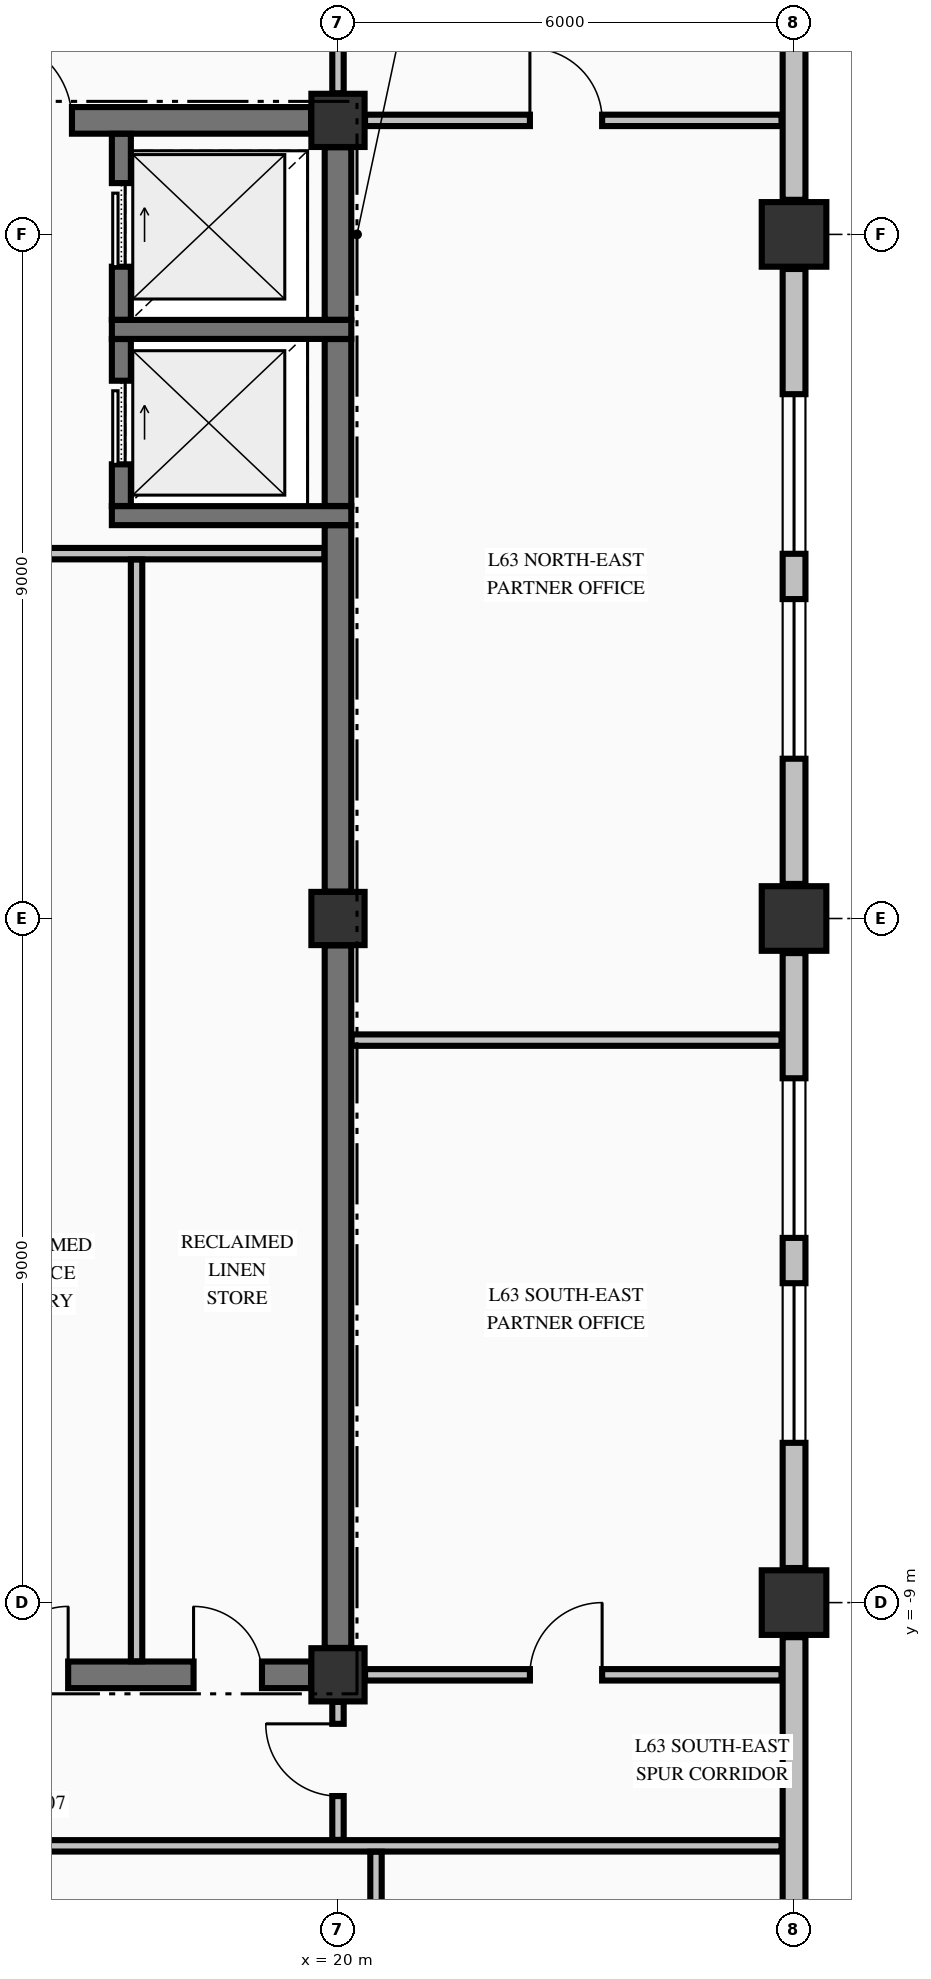
"""IFC4 building model, lengths in metres.
Left out: names, types, materials, properties, quantities, classifications, styles, units other than length and angle.
Written with IfcOpenShell. Run it as: python <this file> out.ifc"""

import sys

from ifc_helpers import new_model, si_unit, direction, frame, frame_2d, origin, origin_2d, place, context, subcontext, project, spatial, rectangle, extrude, element, fill, save


model = new_model("IFC4")
c1 = context("Model", 3, precision=1e-05, world=origin(), true_north=direction((0.0, 1.0)))
c2 = subcontext(c1, "Body", "Model", "MODEL_VIEW")
j1 = project(units=[si_unit("LENGTHUNIT", "METRE"), si_unit("PLANEANGLEUNIT", "RADIAN")], contexts=[c1])
p1 = place(None, origin())
s1 = spatial("IfcSite", under=j1, at=p1, CompositionType="ELEMENT")
p2 = place(p1, origin())
s2 = spatial("IfcBuilding", under=s1, at=p2, CompositionType="ELEMENT")
p3 = place(p2, frame((0.0, 0.0, 239.74)))
s3 = spatial("IfcBuildingStorey", under=s2, at=p3, CompositionType="ELEMENT", Elevation=239.74)
for number, where, z_axis, x_axis in (
    (1, (26.0, -9.0, -0.25), (0.0, 0.0, 1.0), (1.0, 0.0, 0.0)),
    (2, (26.0, 0.0, -0.25), (0.0, 0.0, 1.0), (1.0, 0.0, 0.0)),
    (3, (26.0, 9.0, -0.25), (0.0, 0.0, 1.0), (1.0, 0.0, 0.0)),
):
    element("IfcColumn", number, at=place(p3, frame(where, z_axis=z_axis, x_axis=x_axis)), inside=s3, PredefinedType="COLUMN", context=c2, shape_type="SweptSolid", body=[
        extrude(rectangle(XDim=0.85, YDim=0.85, at=origin_2d()), origin(), (0.0, 0.0, 1.0), 3.23),
    ])
for number, where, z_axis, x_axis in (
    (4, (20.0, -9.95, -0.25), (0.0, 0.0, 1.0), (1.0, 0.0, 0.0)),
    (5, (20.0, 10.5, -0.25), (0.0, 0.0, 1.0), (1.0, 0.0, 0.0)),
    (6, (20.0, 0.0, -0.25), (0.0, 0.0, 1.0), (1.0, 0.0, 0.0)),
):
    element("IfcColumn", number, at=place(p3, frame(where, z_axis=z_axis, x_axis=x_axis)), inside=s3, PredefinedType="COLUMN", context=c2, shape_type="SweptSolid", body=[
        extrude(rectangle(XDim=0.7, YDim=0.7, at=origin_2d()), origin(), (0.0, 0.0, 1.0), 3.23),
    ])
p4 = place(p3, frame((26.0, -17.545, 0.0), z_axis=(0.0, 0.0, 1.0), x_axis=(0.0, 1.0, 0.0)))
e7 = element("IfcWall", 7, at=p4, inside=s3, PredefinedType="STANDARD", context=c2, shape_type="SweptSolid", body=[
    extrude(rectangle(XDim=8.09, YDim=0.3, at=frame_2d((4.045, 0.0))), origin(), (0.0, 0.0, 1.0), 2.372),
])
p5 = place(p3, frame((26.0, -8.545, 0.0), z_axis=(0.0, 0.0, 1.0), x_axis=(0.0, 1.0, 0.0)))
e8 = element("IfcWall", 8, at=p5, inside=s3, PredefinedType="STANDARD", context=c2, shape_type="SweptSolid", body=[
    extrude(rectangle(XDim=8.09, YDim=0.3, at=frame_2d((4.045, 0.0))), origin(), (0.0, 0.0, 1.0), 2.372),
])
p6 = place(p5, frame((1.647, 0.0, 0.7)))
e9 = element("IfcOpeningElement", 9, at=p6, cuts=e8, PredefinedType="OPENING", context=c2, shape_type="SweptSolid", body=[
    extrude(rectangle(XDim=2.1, YDim=1.5, at=frame_2d((1.05, 0.75))), frame((0.0, 0.16, 0.0), z_axis=(0.0, -1.0, 0.0), x_axis=(1.0, 0.0, 0.0)), (0.0, 0.0, 1.0), 0.32),
])
p7 = place(p5, frame((4.343, 0.0, 0.7)))
e10 = element("IfcOpeningElement", 10, at=p7, cuts=e8, PredefinedType="OPENING", context=c2, shape_type="SweptSolid", body=[
    extrude(rectangle(XDim=2.1, YDim=1.5, at=frame_2d((1.05, 0.75))), frame((0.0, 0.16, 0.0), z_axis=(0.0, -1.0, 0.0), x_axis=(1.0, 0.0, 0.0)), (0.0, 0.0, 1.0), 0.32),
])
p8 = place(p3, frame((26.0, 0.455, 0.0), z_axis=(0.0, 0.0, 1.0), x_axis=(0.0, 1.0, 0.0)))
e11 = element("IfcWall", 11, at=p8, inside=s3, PredefinedType="STANDARD", context=c2, shape_type="SweptSolid", body=[
    extrude(rectangle(XDim=8.09, YDim=0.3, at=frame_2d((4.045, 0.0))), origin(), (0.0, 0.0, 1.0), 2.372),
])
p9 = place(p8, frame((1.647, 0.0, 0.7)))
e12 = element("IfcOpeningElement", 12, at=p9, cuts=e11, PredefinedType="OPENING", context=c2, shape_type="SweptSolid", body=[
    extrude(rectangle(XDim=2.1, YDim=1.5, at=frame_2d((1.05, 0.75))), frame((0.0, 0.16, 0.0), z_axis=(0.0, -1.0, 0.0), x_axis=(1.0, 0.0, 0.0)), (0.0, 0.0, 1.0), 0.32),
])
p10 = place(p8, frame((4.343, 0.0, 0.7)))
e13 = element("IfcOpeningElement", 13, at=p10, cuts=e11, PredefinedType="OPENING", context=c2, shape_type="SweptSolid", body=[
    extrude(rectangle(XDim=2.1, YDim=1.5, at=frame_2d((1.05, 0.75))), frame((0.0, 0.16, 0.0), z_axis=(0.0, -1.0, 0.0), x_axis=(1.0, 0.0, 0.0)), (0.0, 0.0, 1.0), 0.32),
])
p11 = place(p3, frame((26.0, 9.455, 0.0), z_axis=(0.0, 0.0, 1.0), x_axis=(0.0, 1.0, 0.0)))
e14 = element("IfcWall", 14, at=p11, inside=s3, PredefinedType="STANDARD", context=c2, shape_type="SweptSolid", body=[
    extrude(rectangle(XDim=8.09, YDim=0.3, at=frame_2d((4.045, 0.0))), origin(), (0.0, 0.0, 1.0), 2.372),
])
p12 = place(p3, frame((14.7, -9.95, 0.0), z_axis=(0.0, 0.0, 1.0), x_axis=(1.0, 0.0, 0.0)))
e15 = element("IfcWall", 15, at=p12, inside=s3, PredefinedType="SHEAR", context=c2, shape_type="SweptSolid", body=[
    extrude(rectangle(XDim=4.946, YDim=0.35, at=frame_2d((2.473, 0.0))), origin(), (0.0, 0.0, 1.0), 2.98),
])
p13 = place(p12, frame((0.85, 0.0, 0.0)))
e16 = element("IfcOpeningElement", 16, at=p13, cuts=e15, PredefinedType="OPENING", context=c2, shape_type="SweptSolid", body=[
    extrude(rectangle(XDim=0.9, YDim=2.15, at=frame_2d((0.45, 1.075))), frame((0.0, 0.185, 0.0), z_axis=(0.0, -1.0, 0.0), x_axis=(1.0, 0.0, 0.0)), (0.0, 0.0, 1.0), 0.37),
])
p14 = place(p12, frame((3.4, 0.0, 0.0)))
e17 = element("IfcOpeningElement", 17, at=p14, cuts=e15, PredefinedType="OPENING", context=c2, shape_type="SweptSolid", body=[
    extrude(rectangle(XDim=0.9, YDim=2.15, at=frame_2d((0.45, 1.075))), frame((0.0, 0.185, 0.0), z_axis=(0.0, -1.0, 0.0), x_axis=(1.0, 0.0, 0.0)), (0.0, 0.0, 1.0), 0.37),
])
for number, where, z_axis, x_axis in (
    (18, (17.025, 5.3, 0.0), (0.0, 0.0, 1.0), (1.0, 0.0, 0.0)),
    (19, (17.025, 7.75, 0.0), (0.0, 0.0, 1.0), (1.0, 0.0, 0.0)),
):
    element("IfcWall", number, at=place(p3, frame(where, z_axis=z_axis, x_axis=x_axis)), inside=s3, PredefinedType="SOLIDWALL", context=c2, shape_type="SweptSolid", body=[
        extrude(rectangle(XDim=3.15, YDim=0.25, at=frame_2d((1.575, 0.0))), origin(), (0.0, 0.0, 1.0), 2.98),
    ])
p15 = place(p3, frame((14.7, 10.5, 0.0), z_axis=(0.0, 0.0, 1.0), x_axis=(1.0, 0.0, 0.0)))
e20 = element("IfcWall", 20, at=p15, inside=s3, PredefinedType="SHEAR", context=c2, shape_type="SweptSolid", body=[
    extrude(rectangle(XDim=4.946, YDim=0.35, at=frame_2d((2.473, 0.0))), origin(), (0.0, 0.0, 1.0), 2.98),
])
p16 = place(p15, frame((0.7, 0.0, 0.0)))
e21 = element("IfcOpeningElement", 21, at=p16, cuts=e20, PredefinedType="OPENING", context=c2, shape_type="SweptSolid", body=[
    extrude(rectangle(XDim=1.1, YDim=2.15, at=frame_2d((0.55, 1.075))), frame((0.0, 0.185, 0.0), z_axis=(0.0, -1.0, 0.0), x_axis=(1.0, 0.0, 0.0)), (0.0, 0.0, 1.0), 0.37),
])
p17 = place(p3, frame((-20.075, -12.2, 0.0), z_axis=(0.0, 0.0, 1.0), x_axis=(1.0, 0.0, 0.0)))
e22 = element("IfcWall", 22, at=p17, inside=s3, PredefinedType="PARTITIONING", context=c2, shape_type="SweptSolid", body=[
    extrude(rectangle(XDim=45.91, YDim=0.15, at=frame_2d((22.955, 0.0))), origin(), (0.0, 0.0, 1.0), 2.98),
])
p18 = place(p17, frame((9.1, 0.0, 0.0)))
e23 = element("IfcOpeningElement", 23, at=p18, cuts=e22, PredefinedType="OPENING", context=c2, shape_type="SweptSolid", body=[
    extrude(rectangle(XDim=0.95, YDim=2.15, at=frame_2d((0.475, 1.075))), frame((0.0, 0.085, 0.0), z_axis=(0.0, -1.0, 0.0), x_axis=(1.0, 0.0, 0.0)), (0.0, 0.0, 1.0), 0.17),
])
p19 = place(p17, frame((17.2, 0.0, 0.0)))
e24 = element("IfcOpeningElement", 24, at=p19, cuts=e22, PredefinedType="OPENING", context=c2, shape_type="SweptSolid", body=[
    extrude(rectangle(XDim=1.05, YDim=2.15, at=frame_2d((0.525, 1.075))), frame((0.0, 0.085, 0.0), z_axis=(0.0, -1.0, 0.0), x_axis=(1.0, 0.0, 0.0)), (0.0, 0.0, 1.0), 0.17),
])
p20 = place(p17, frame((25.35, 0.0, 0.0)))
e25 = element("IfcOpeningElement", 25, at=p20, cuts=e22, PredefinedType="OPENING", context=c2, shape_type="SweptSolid", body=[
    extrude(rectangle(XDim=1.05, YDim=2.15, at=frame_2d((0.525, 1.075))), frame((0.0, 0.085, 0.0), z_axis=(0.0, -1.0, 0.0), x_axis=(1.0, 0.0, 0.0)), (0.0, 0.0, 1.0), 0.17),
])
p21 = place(p3, frame((20.356, -9.95, 0.0), z_axis=(0.0, 0.0, 1.0), x_axis=(1.0, 0.0, 0.0)))
e26 = element("IfcWall", 26, at=p21, inside=s3, PredefinedType="PARTITIONING", context=c2, shape_type="SweptSolid", body=[
    extrude(rectangle(XDim=5.479, YDim=0.15, at=frame_2d((2.74, 0.0))), origin(), (0.0, 0.0, 1.0), 2.98),
])
p22 = place(p21, frame((2.169, 0.0, 0.0)))
e27 = element("IfcOpeningElement", 27, at=p22, cuts=e26, PredefinedType="OPENING", context=c2, shape_type="SweptSolid", body=[
    extrude(rectangle(XDim=0.95, YDim=2.15, at=frame_2d((0.475, 1.075))), frame((0.0, 0.085, 0.0), z_axis=(0.0, -1.0, 0.0), x_axis=(1.0, 0.0, 0.0)), (0.0, 0.0, 1.0), 0.17),
])
p23 = place(p3, frame((20.178, -1.6, 0.0), z_axis=(0.0, 0.0, 1.0), x_axis=(1.0, 0.0, 0.0)))
e28 = element("IfcWall", 28, at=p23, inside=s3, PredefinedType="PARTITIONING", context=c2, shape_type="SweptSolid", body=[
    extrude(rectangle(XDim=5.657, YDim=0.15, at=frame_2d((2.829, 0.0))), origin(), (0.0, 0.0, 1.0), 2.98),
])
p24 = place(p3, frame((14.878, 4.8, 0.0), z_axis=(0.0, 0.0, 1.0), x_axis=(1.0, 0.0, 0.0)))
e29 = element("IfcWall", 29, at=p24, inside=s3, PredefinedType="PARTITIONING", context=c2, shape_type="SweptSolid", body=[
    extrude(rectangle(XDim=4.944, YDim=0.15, at=frame_2d((2.472, 0.0))), origin(), (0.0, 0.0, 1.0), 2.98),
])
p25 = place(p3, frame((20.356, 10.5, 0.0), z_axis=(0.0, 0.0, 1.0), x_axis=(1.0, 0.0, 0.0)))
e30 = element("IfcWall", 30, at=p25, inside=s3, PredefinedType="PARTITIONING", context=c2, shape_type="SweptSolid", body=[
    extrude(rectangle(XDim=5.479, YDim=0.15, at=frame_2d((2.74, 0.0))), origin(), (0.0, 0.0, 1.0), 2.98),
])
p26 = place(p25, frame((2.169, 0.0, 0.0)))
e31 = element("IfcOpeningElement", 31, at=p26, cuts=e30, PredefinedType="OPENING", context=c2, shape_type="SweptSolid", body=[
    extrude(rectangle(XDim=0.95, YDim=2.15, at=frame_2d((0.475, 1.075))), frame((0.0, 0.085, 0.0), z_axis=(0.0, -1.0, 0.0), x_axis=(1.0, 0.0, 0.0)), (0.0, 0.0, 1.0), 0.17),
])
p27 = place(p3, frame((17.15, 5.427, 0.0), z_axis=(0.0, 0.0, 1.0), x_axis=(0.0, 1.0, 0.0)))
e32 = element("IfcWall", 32, at=p27, inside=s3, PredefinedType="SOLIDWALL", context=c2, shape_type="SweptSolid", body=[
    extrude(rectangle(XDim=2.196, YDim=0.25, at=frame_2d((1.098, 0.0))), origin(), (0.0, 0.0, 1.0), 2.98),
])
p28 = place(p27, frame((0.548, 0.0, 0.0)))
e33 = element("IfcOpeningElement", 33, at=p28, cuts=e32, PredefinedType="OPENING", context=c2, shape_type="SweptSolid", body=[
    extrude(rectangle(XDim=1.1, YDim=2.2, at=frame_2d((0.55, 1.1))), frame((0.0, 0.135, 0.0), z_axis=(0.0, -1.0, 0.0), x_axis=(1.0, 0.0, 0.0)), (0.0, 0.0, 1.0), 0.27),
])
p29 = place(p3, frame((17.15, 7.877, 0.0), z_axis=(0.0, 0.0, 1.0), x_axis=(0.0, 1.0, 0.0)))
e34 = element("IfcWall", 34, at=p29, inside=s3, PredefinedType="SOLIDWALL", context=c2, shape_type="SweptSolid", body=[
    extrude(rectangle(XDim=2.446, YDim=0.25, at=frame_2d((1.223, 0.0))), origin(), (0.0, 0.0, 1.0), 2.98),
])
p30 = place(p29, frame((0.698, 0.0, 0.0)))
e35 = element("IfcOpeningElement", 35, at=p30, cuts=e34, PredefinedType="OPENING", context=c2, shape_type="SweptSolid", body=[
    extrude(rectangle(XDim=1.1, YDim=2.2, at=frame_2d((0.55, 1.1))), frame((0.0, 0.135, 0.0), z_axis=(0.0, -1.0, 0.0), x_axis=(1.0, 0.0, 0.0)), (0.0, 0.0, 1.0), 0.27),
])
p31 = place(p3, frame((20.0, -9.596, 0.0), z_axis=(0.0, 0.0, 1.0), x_axis=(0.0, 1.0, 0.0)))
e36 = element("IfcWall", 36, at=p31, inside=s3, PredefinedType="SHEAR", context=c2, shape_type="SweptSolid", body=[
    extrude(rectangle(XDim=9.242, YDim=0.35, at=frame_2d((4.621, 0.0))), origin(), (0.0, 0.0, 1.0), 2.98),
])
p32 = place(p3, frame((20.0, 0.354, 0.0), z_axis=(0.0, 0.0, 1.0), x_axis=(0.0, 1.0, 0.0)))
e37 = element("IfcWall", 37, at=p32, inside=s3, PredefinedType="SHEAR", context=c2, shape_type="SweptSolid", body=[
    extrude(rectangle(XDim=4.819, YDim=0.35, at=frame_2d((2.41, 0.0))), origin(), (0.0, 0.0, 1.0), 2.98),
])
p33 = place(p3, frame((20.0, 5.427, 0.0), z_axis=(0.0, 0.0, 1.0), x_axis=(0.0, 1.0, 0.0)))
e38 = element("IfcWall", 38, at=p33, inside=s3, PredefinedType="SHEAR", context=c2, shape_type="SweptSolid", body=[
    extrude(rectangle(XDim=2.196, YDim=0.35, at=frame_2d((1.098, 0.0))), origin(), (0.0, 0.0, 1.0), 2.98),
])
p34 = place(p3, frame((20.0, 7.877, 0.0), z_axis=(0.0, 0.0, 1.0), x_axis=(0.0, 1.0, 0.0)))
e39 = element("IfcWall", 39, at=p34, inside=s3, PredefinedType="SHEAR", context=c2, shape_type="SweptSolid", body=[
    extrude(rectangle(XDim=2.269, YDim=0.35, at=frame_2d((1.135, 0.0))), origin(), (0.0, 0.0, 1.0), 2.98),
])
p35 = place(p3, frame((17.35, -9.772, 0.0), z_axis=(0.0, 0.0, 1.0), x_axis=(0.0, 1.0, 0.0)))
e40 = element("IfcWall", 40, at=p35, inside=s3, PredefinedType="PARTITIONING", context=c2, shape_type="SweptSolid", body=[
    extrude(rectangle(XDim=14.494, YDim=0.15, at=frame_2d((7.247, 0.0))), origin(), (0.0, 0.0, 1.0), 2.98),
])
p36 = place(p3, frame((20.0, -12.122, 0.0), z_axis=(0.0, 0.0, 1.0), x_axis=(0.0, 1.0, 0.0)))
e41 = element("IfcWall", 41, at=p36, inside=s3, PredefinedType="PARTITIONING", context=c2, shape_type="SweptSolid", body=[
    extrude(rectangle(XDim=1.816, YDim=0.15, at=frame_2d((0.908, 0.0))), origin(), (0.0, 0.0, 1.0), 2.98),
])
p37 = place(p36, frame((0.577, 0.0, 0.0)))
e42 = element("IfcOpeningElement", 42, at=p37, cuts=e41, PredefinedType="OPENING", context=c2, shape_type="SweptSolid", body=[
    extrude(rectangle(XDim=0.95, YDim=2.15, at=frame_2d((0.475, 1.075))), frame((0.0, 0.085, 0.0), z_axis=(0.0, -1.0, 0.0), x_axis=(1.0, 0.0, 0.0)), (0.0, 0.0, 1.0), 0.17),
])
p38 = place(p3, frame((20.0, 10.856, 0.0), z_axis=(0.0, 0.0, 1.0), x_axis=(0.0, 1.0, 0.0)))
e43 = element("IfcWall", 43, at=p38, inside=s3, PredefinedType="PARTITIONING", context=c2, shape_type="SweptSolid", body=[
    extrude(rectangle(XDim=2.666, YDim=0.15, at=frame_2d((1.333, 0.0))), origin(), (0.0, 0.0, 1.0), 2.98),
])
p39 = place(p38, frame((0.719, 0.0, 0.0)))
e44 = element("IfcOpeningElement", 44, at=p39, cuts=e43, PredefinedType="OPENING", context=c2, shape_type="SweptSolid", body=[
    extrude(rectangle(XDim=0.95, YDim=2.15, at=frame_2d((0.475, 1.075))), frame((0.0, 0.085, 0.0), z_axis=(0.0, -1.0, 0.0), x_axis=(1.0, 0.0, 0.0)), (0.0, 0.0, 1.0), 0.17),
])
p40 = place(p3, frame((20.5, -17.569, 0.0), z_axis=(0.0, 0.0, 1.0), x_axis=(0.0, 1.0, 0.0)))
e45 = element("IfcWall", 45, at=p40, inside=s3, PredefinedType="PARTITIONING", context=c2, shape_type="SweptSolid", body=[
    extrude(rectangle(XDim=5.291, YDim=0.15, at=frame_2d((2.646, 0.0))), origin(), (0.0, 0.0, 1.0), 2.98),
])
p41 = place(p6, origin())
e46 = element("IfcWindow", 46, at=p41, inside=s3, PartitioningType="SINGLE_PANEL", PredefinedType="WINDOW", context=c2, shape_type="SweptSolid", body=[
    extrude(rectangle(XDim=2.1, YDim=1.5, at=frame_2d((1.05, 0.75))), frame((0.0, 0.03, 0.0), z_axis=(0.0, -1.0, 0.0), x_axis=(1.0, 0.0, 0.0)), (0.0, 0.0, 1.0), 0.06),
])
fill(e9, e46)
p42 = place(p7, origin())
e47 = element("IfcWindow", 47, at=p42, inside=s3, PartitioningType="SINGLE_PANEL", PredefinedType="WINDOW", context=c2, shape_type="SweptSolid", body=[
    extrude(rectangle(XDim=2.1, YDim=1.5, at=frame_2d((1.05, 0.75))), frame((0.0, 0.03, 0.0), z_axis=(0.0, -1.0, 0.0), x_axis=(1.0, 0.0, 0.0)), (0.0, 0.0, 1.0), 0.06),
])
fill(e10, e47)
p43 = place(p9, origin())
e48 = element("IfcWindow", 48, at=p43, inside=s3, PartitioningType="SINGLE_PANEL", PredefinedType="WINDOW", context=c2, shape_type="SweptSolid", body=[
    extrude(rectangle(XDim=2.1, YDim=1.5, at=frame_2d((1.05, 0.75))), frame((0.0, 0.03, 0.0), z_axis=(0.0, -1.0, 0.0), x_axis=(1.0, 0.0, 0.0)), (0.0, 0.0, 1.0), 0.06),
])
fill(e12, e48)
p44 = place(p10, origin())
e49 = element("IfcWindow", 49, at=p44, inside=s3, PartitioningType="SINGLE_PANEL", PredefinedType="WINDOW", context=c2, shape_type="SweptSolid", body=[
    extrude(rectangle(XDim=2.1, YDim=1.5, at=frame_2d((1.05, 0.75))), frame((0.0, 0.03, 0.0), z_axis=(0.0, -1.0, 0.0), x_axis=(1.0, 0.0, 0.0)), (0.0, 0.0, 1.0), 0.06),
])
fill(e13, e49)
p45 = place(p28, origin())
e50 = element("IfcDoor", 50, at=p45, inside=s3, OperationType="SLIDING_TO_RIGHT", PredefinedType="DOOR", context=c2, shape_type="SweptSolid", body=[
    extrude(rectangle(XDim=1.1, YDim=2.2, at=frame_2d((0.55, 1.1))), frame((0.0, 0.025, 0.0), z_axis=(0.0, -1.0, 0.0), x_axis=(1.0, 0.0, 0.0)), (0.0, 0.0, 1.0), 0.05),
])
fill(e33, e50)
p46 = place(p30, origin())
e51 = element("IfcDoor", 51, at=p46, inside=s3, OperationType="SLIDING_TO_RIGHT", PredefinedType="DOOR", context=c2, shape_type="SweptSolid", body=[
    extrude(rectangle(XDim=1.1, YDim=2.2, at=frame_2d((0.55, 1.1))), frame((0.0, 0.025, 0.0), z_axis=(0.0, -1.0, 0.0), x_axis=(1.0, 0.0, 0.0)), (0.0, 0.0, 1.0), 0.05),
])
fill(e35, e51)
p47 = place(p16, origin())
e52 = element("IfcDoor", 52, at=p47, inside=s3, OperationType="SINGLE_SWING_LEFT", PredefinedType="DOOR", context=c2, shape_type="SweptSolid", body=[
    extrude(rectangle(XDim=1.1, YDim=2.15, at=frame_2d((0.55, 1.075))), frame((0.0, 0.025, 0.0), z_axis=(0.0, -1.0, 0.0), x_axis=(1.0, 0.0, 0.0)), (0.0, 0.0, 1.0), 0.05),
])
fill(e21, e52)
p48 = place(p13, origin())
e53 = element("IfcDoor", 53, at=p48, inside=s3, OperationType="SINGLE_SWING_RIGHT", PredefinedType="DOOR", context=c2, shape_type="SweptSolid", body=[
    extrude(rectangle(XDim=0.9, YDim=2.15, at=frame_2d((0.45, 1.075))), frame((0.0, 0.025, 0.0), z_axis=(0.0, -1.0, 0.0), x_axis=(1.0, 0.0, 0.0)), (0.0, 0.0, 1.0), 0.05),
])
fill(e16, e53)
p49 = place(p14, origin())
e54 = element("IfcDoor", 54, at=p49, inside=s3, OperationType="SINGLE_SWING_LEFT", PredefinedType="DOOR", context=c2, shape_type="SweptSolid", body=[
    extrude(rectangle(XDim=0.9, YDim=2.15, at=frame_2d((0.45, 1.075))), frame((0.0, 0.025, 0.0), z_axis=(0.0, -1.0, 0.0), x_axis=(1.0, 0.0, 0.0)), (0.0, 0.0, 1.0), 0.05),
])
fill(e17, e54)
p50 = place(p37, origin())
e55 = element("IfcDoor", 55, at=p50, inside=s3, OperationType="SINGLE_SWING_RIGHT", PredefinedType="DOOR", context=c2, shape_type="SweptSolid", body=[
    extrude(rectangle(XDim=0.95, YDim=2.15, at=frame_2d((0.475, 1.075))), frame((0.0, 0.025, 0.0), z_axis=(0.0, -1.0, 0.0), x_axis=(1.0, 0.0, 0.0)), (0.0, 0.0, 1.0), 0.05),
])
fill(e42, e55)
p51 = place(p26, origin())
e56 = element("IfcDoor", 56, at=p51, inside=s3, OperationType="SINGLE_SWING_LEFT", PredefinedType="DOOR", context=c2, shape_type="SweptSolid", body=[
    extrude(rectangle(XDim=0.95, YDim=2.15, at=frame_2d((0.475, 1.075))), frame((0.0, 0.025, 0.0), z_axis=(0.0, -1.0, 0.0), x_axis=(1.0, 0.0, 0.0)), (0.0, 0.0, 1.0), 0.05),
])
fill(e31, e56)
p52 = place(p22, origin())
e57 = element("IfcDoor", 57, at=p52, inside=s3, OperationType="SINGLE_SWING_RIGHT", PredefinedType="DOOR", context=c2, shape_type="SweptSolid", body=[
    extrude(rectangle(XDim=0.95, YDim=2.15, at=frame_2d((0.475, 1.075))), frame((0.0, 0.025, 0.0), z_axis=(0.0, -1.0, 0.0), x_axis=(1.0, 0.0, 0.0)), (0.0, 0.0, 1.0), 0.05),
])
fill(e27, e57)
save(model, sys.argv[1])
